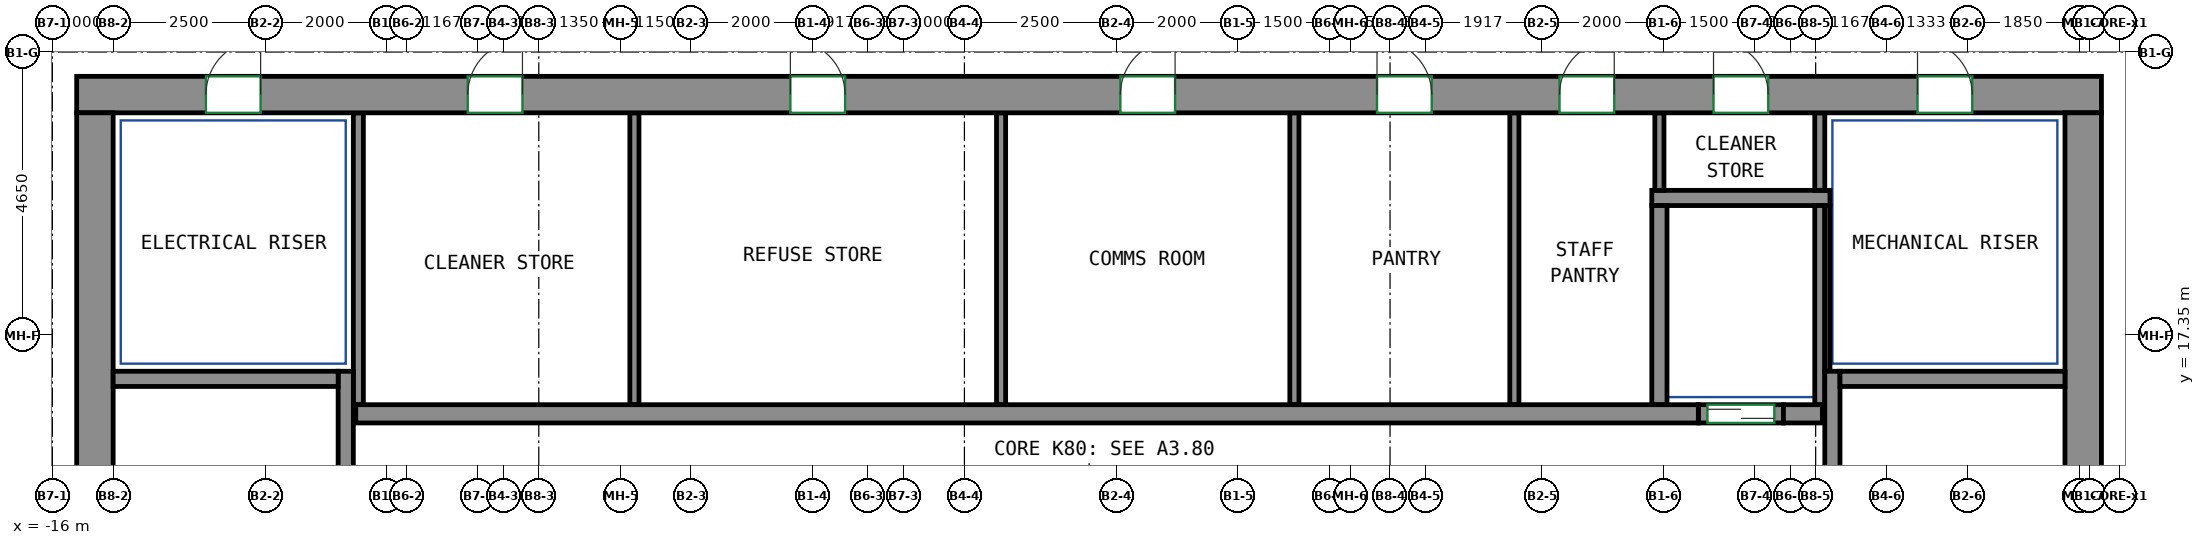
"""IFC4 building model, lengths in metres.
Left out: names, types, materials, properties, quantities, classifications, styles, units other than length and angle.
Written with IfcOpenShell. Run it as: python <this file> out.ifc"""

import sys

from ifc_helpers import new_model, si_unit, direction, frame, frame_2d, origin, place, context, subcontext, project, spatial, rectangle, extrude, source, transform, mapped, element, fill, save


model = new_model("IFC4")
c1 = context("Model", 3, precision=1e-05, world=origin(), true_north=direction((0.0, 1.0)))
c2 = subcontext(c1, "Body", "Model", "MODEL_VIEW")
j1 = project(units=[si_unit("LENGTHUNIT", "METRE"), si_unit("PLANEANGLEUNIT", "RADIAN")], contexts=[c1])
p1 = place(None, origin())
s1 = spatial("IfcSite", under=j1, at=p1, CompositionType="ELEMENT")
p2 = place(p1, origin())
s2 = spatial("IfcBuilding", under=s1, at=p2, CompositionType="ELEMENT")
p3 = place(p2, frame((0.0, 0.0, 315.4)))
s3 = spatial("IfcBuildingStorey", under=s2, at=p3, CompositionType="ELEMENT", Elevation=315.4)
m1 = source(origin(), c2, "Body", "SweptSolid", [
    extrude(rectangle(XDim=33.3, YDim=0.6, at=frame_2d((16.65, 0.0))), origin(), (0.0, 0.0, 1.0), 3.0),
])
p4 = place(p3, frame((-15.6, 21.3, 0.0), z_axis=(0.0, 0.0, 1.0), x_axis=(1.0, 0.0, 0.0)))
e1 = element("IfcWall", 1, at=p4, inside=s3, PredefinedType="SHEAR", context=c2, shape_type="MappedRepresentation", body=[
    mapped(m1, transform((0.0, 0.0, 0.0))),
])
p5 = place(p4, frame((6.431, 0.0, 0.0)))
e2 = element("IfcOpeningElement", 2, at=p5, cuts=e1, PredefinedType="OPENING", context=c2, shape_type="SweptSolid", body=[
    extrude(rectangle(XDim=0.9, YDim=2.1, at=frame_2d((0.45, 1.05))), frame((0.0, 0.31, 0.0), z_axis=(0.0, -1.0, 0.0), x_axis=(1.0, 0.0, 0.0)), (0.0, 0.0, 1.0), 0.62),
])
p6 = place(p4, frame((11.738, 0.0, 0.0)))
e3 = element("IfcOpeningElement", 3, at=p6, cuts=e1, PredefinedType="OPENING", context=c2, shape_type="SweptSolid", body=[
    extrude(rectangle(XDim=0.9, YDim=2.1, at=frame_2d((0.45, 1.05))), frame((0.0, 0.31, 0.0), z_axis=(0.0, -1.0, 0.0), x_axis=(1.0, 0.0, 0.0)), (0.0, 0.0, 1.0), 0.62),
])
p7 = place(p4, frame((17.165, 0.0, 0.0)))
e4 = element("IfcOpeningElement", 4, at=p7, cuts=e1, PredefinedType="OPENING", context=c2, shape_type="SweptSolid", body=[
    extrude(rectangle(XDim=0.9, YDim=2.1, at=frame_2d((0.45, 1.05))), frame((0.0, 0.31, 0.0), z_axis=(0.0, -1.0, 0.0), x_axis=(1.0, 0.0, 0.0)), (0.0, 0.0, 1.0), 0.62),
])
p8 = place(p4, frame((21.386, 0.0, 0.0)))
e5 = element("IfcOpeningElement", 5, at=p8, cuts=e1, PredefinedType="OPENING", context=c2, shape_type="SweptSolid", body=[
    extrude(rectangle(XDim=0.9, YDim=2.1, at=frame_2d((0.45, 1.05))), frame((0.0, 0.31, 0.0), z_axis=(0.0, -1.0, 0.0), x_axis=(1.0, 0.0, 0.0)), (0.0, 0.0, 1.0), 0.62),
])
p9 = place(p4, frame((24.387, 0.0, 0.0)))
e6 = element("IfcOpeningElement", 6, at=p9, cuts=e1, PredefinedType="OPENING", context=c2, shape_type="SweptSolid", body=[
    extrude(rectangle(XDim=0.9, YDim=2.1, at=frame_2d((0.45, 1.05))), frame((0.0, 0.31, 0.0), z_axis=(0.0, -1.0, 0.0), x_axis=(1.0, 0.0, 0.0)), (0.0, 0.0, 1.0), 0.62),
])
p10 = place(p4, frame((26.92, 0.0, 0.0)))
e7 = element("IfcOpeningElement", 7, at=p10, cuts=e1, PredefinedType="OPENING", context=c2, shape_type="SweptSolid", body=[
    extrude(rectangle(XDim=0.9, YDim=2.1, at=frame_2d((0.45, 1.05))), frame((0.0, 0.31, 0.0), z_axis=(0.0, -1.0, 0.0), x_axis=(1.0, 0.0, 0.0)), (0.0, 0.0, 1.0), 0.62),
])
p11 = place(p4, frame((2.125, 0.0, 0.0)))
e8 = element("IfcOpeningElement", 8, at=p11, cuts=e1, PredefinedType="OPENING", context=c2, shape_type="SweptSolid", body=[
    extrude(rectangle(XDim=0.9, YDim=2.1, at=frame_2d((0.45, 1.05))), frame((0.0, 0.31, 0.0), z_axis=(0.0, -1.0, 0.0), x_axis=(1.0, 0.0, 0.0)), (0.0, 0.0, 1.0), 0.62),
])
p12 = place(p4, frame((30.275, 0.0, 0.0)))
e9 = element("IfcOpeningElement", 9, at=p12, cuts=e1, PredefinedType="OPENING", context=c2, shape_type="SweptSolid", body=[
    extrude(rectangle(XDim=0.9, YDim=2.1, at=frame_2d((0.45, 1.05))), frame((0.0, 0.31, 0.0), z_axis=(0.0, -1.0, 0.0), x_axis=(1.0, 0.0, 0.0)), (0.0, 0.0, 1.0), 0.62),
])
m2 = source(origin(), c2, "Body", "SweptSolid", [
    extrude(rectangle(XDim=12.0, YDim=0.6, at=frame_2d((6.0, 0.0))), origin(), (0.0, 0.0, 1.0), 3.0),
])
for number, where, z_axis, x_axis in (
    (10, (-15.3, 9.0, 0.0), (0.0, 0.0, 1.0), (0.0, 1.0, 0.0)),
    (11, (17.4, 9.0, 0.0), (0.0, 0.0, 1.0), (0.0, 1.0, 0.0)),
):
    element("IfcWall", number, at=place(p3, frame(where, z_axis=z_axis, x_axis=x_axis)), inside=s3, PredefinedType="SHEAR", context=c2, shape_type="MappedRepresentation", body=[
        mapped(m2, transform((0.0, 0.0, 0.0))),
    ])
m3 = source(origin(), c2, "Body", "SweptSolid", [
    extrude(rectangle(XDim=7.75, YDim=0.25, at=frame_2d((3.875, 0.0))), origin(), (0.0, 0.0, 1.0), 3.0),
])
p13 = place(p3, frame((-11.175, 9.0, 0.0), z_axis=(0.0, 0.0, 1.0), x_axis=(0.0, 1.0, 0.0)))
e12 = element("IfcWall", 12, at=p13, inside=s3, PredefinedType="SHEAR", context=c2, shape_type="MappedRepresentation", body=[
    mapped(m3, transform((0.0, 0.0, 0.0))),
])
m4 = source(origin(), c2, "Body", "SweptSolid", [
    extrude(rectangle(XDim=3.7, YDim=0.25, at=frame_2d((1.85, 0.0))), origin(), (0.0, 0.0, 1.0), 3.0),
])
p14 = place(p3, frame((-15.0, 16.625, 0.0), z_axis=(0.0, 0.0, 1.0), x_axis=(1.0, 0.0, 0.0)))
e13 = element("IfcWall", 13, at=p14, inside=s3, PredefinedType="SHEAR", context=c2, shape_type="MappedRepresentation", body=[
    mapped(m4, transform((0.0, 0.0, 0.0))),
])
p15 = place(p3, frame((13.275, 9.0, 0.0), z_axis=(0.0, 0.0, 1.0), x_axis=(0.0, 1.0, 0.0)))
e14 = element("IfcWall", 14, at=p15, inside=s3, PredefinedType="SHEAR", context=c2, shape_type="MappedRepresentation", body=[
    mapped(m3, transform((0.0, 0.0, 0.0))),
])
m5 = source(origin(), c2, "Body", "SweptSolid", [
    extrude(rectangle(XDim=3.7, YDim=0.25, at=frame_2d((1.85, 0.0))), origin(), (0.0, 0.0, 1.0), 3.0),
])
p16 = place(p3, frame((13.4, 16.625, 0.0), z_axis=(0.0, 0.0, 1.0), x_axis=(1.0, 0.0, 0.0)))
e15 = element("IfcWall", 15, at=p16, inside=s3, PredefinedType="SHEAR", context=c2, shape_type="MappedRepresentation", body=[
    mapped(m5, transform((0.0, 0.0, 0.0))),
])
m6 = source(origin(), c2, "Body", "SweptSolid", [
    extrude(rectangle(XDim=22.08, YDim=0.3, at=frame_2d((11.04, 0.0))), origin(), (0.0, 0.0, 1.0), 3.0),
])
p17 = place(p3, frame((-11.01, 16.05, 0.0), z_axis=(0.0, 0.0, 1.0), x_axis=(1.0, 0.0, 0.0)))
e16 = element("IfcWall", 16, at=p17, inside=s3, PredefinedType="SHEAR", context=c2, shape_type="MappedRepresentation", body=[
    mapped(m6, transform((0.0, 0.0, 0.0))),
])
m7 = source(origin(), c2, "Body", "SweptSolid", [
    extrude(rectangle(XDim=0.64, YDim=0.3, at=frame_2d((0.32, 0.0))), origin(), (0.0, 0.0, 1.0), 3.0),
])
p18 = place(p3, frame((12.47, 16.05, 0.0), z_axis=(0.0, 0.0, 1.0), x_axis=(1.0, 0.0, 0.0)))
e17 = element("IfcWall", 17, at=p18, inside=s3, PredefinedType="SHEAR", context=c2, shape_type="MappedRepresentation", body=[
    mapped(m7, transform((0.0, 0.0, 0.0))),
])
m8 = source(origin(), c2, "Body", "SweptSolid", [
    extrude(rectangle(XDim=1.4, YDim=0.3, at=frame_2d((0.7, 0.0))), origin(), (0.0, 0.0, 1.0), 2.4),
])
p19 = place(p3, frame((11.07, 16.05, 0.0), z_axis=(0.0, 0.0, 1.0), x_axis=(1.0, 0.0, 0.0)))
e18 = element("IfcWall", 18, at=p19, inside=s3, PredefinedType="PARTITIONING", context=c2, shape_type="MappedRepresentation", body=[
    mapped(m8, transform((0.0, 0.0, 0.0))),
])
p20 = place(p19, frame((0.15, 0.0, 0.0)))
e19 = element("IfcOpeningElement", 19, at=p20, cuts=e18, PredefinedType="OPENING", context=c2, shape_type="SweptSolid", body=[
    extrude(rectangle(XDim=1.1, YDim=2.1, at=frame_2d((0.55, 1.05))), frame((0.0, 0.16, 0.0), z_axis=(0.0, -1.0, 0.0), x_axis=(1.0, 0.0, 0.0)), (0.0, 0.0, 1.0), 0.32),
])
m9 = source(origin(), c2, "Body", "SweptSolid", [
    extrude(rectangle(XDim=2.93, YDim=0.25, at=frame_2d((1.465, 0.0))), origin(), (0.0, 0.0, 1.0), 3.0),
])
p21 = place(p3, frame((10.305, 19.6, 0.0), z_axis=(0.0, 0.0, 1.0), x_axis=(1.0, 0.0, 0.0)))
e20 = element("IfcWall", 20, at=p21, inside=s3, PredefinedType="PARTITIONING", context=c2, shape_type="MappedRepresentation", body=[
    mapped(m9, transform((0.0, 0.0, 0.0))),
])
m10 = source(origin(), c2, "Body", "SweptSolid", [
    extrude(rectangle(XDim=3.275, YDim=0.165, at=frame_2d((1.638, 0.0))), origin(), (0.0, 0.0, 1.0), 3.0),
])
p22 = place(p3, frame((13.067, 16.2, 0.0), z_axis=(0.0, 0.0, 1.0), x_axis=(0.0, 1.0, 0.0)))
e21 = element("IfcWall", 21, at=p22, inside=s3, PredefinedType="PARTITIONING", context=c2, shape_type="MappedRepresentation", body=[
    mapped(m10, transform((0.0, 0.0, 0.0))),
])
m11 = source(origin(), c2, "Body", "SweptSolid", [
    extrude(rectangle(XDim=1.275, YDim=0.165, at=frame_2d((0.637, 0.0))), origin(), (0.0, 0.0, 1.0), 3.0),
])
p23 = place(p3, frame((13.067, 19.725, 0.0), z_axis=(0.0, 0.0, 1.0), x_axis=(0.0, 1.0, 0.0)))
e22 = element("IfcWall", 22, at=p23, inside=s3, PredefinedType="PARTITIONING", context=c2, shape_type="MappedRepresentation", body=[
    mapped(m11, transform((0.0, 0.0, 0.0))),
])
m12 = source(origin(), c2, "Body", "SweptSolid", [
    extrude(rectangle(XDim=4.8, YDim=0.165, at=frame_2d((2.4, 0.0))), origin(), (0.0, 0.0, 1.0), 3.0),
])
p24 = place(p3, frame((-10.968, 16.2, 0.0), z_axis=(0.0, 0.0, 1.0), x_axis=(0.0, 1.0, 0.0)))
e23 = element("IfcWall", 23, at=p24, inside=s3, PredefinedType="PARTITIONING", context=c2, shape_type="MappedRepresentation", body=[
    mapped(m12, transform((0.0, 0.0, 0.0))),
])
m13 = source(origin(), c2, "Body", "SweptSolid", [
    extrude(rectangle(XDim=3.275, YDim=0.25, at=frame_2d((1.638, 0.0))), origin(), (0.0, 0.0, 1.0), 3.0),
])
p25 = place(p3, frame((10.43, 16.2, 0.0), z_axis=(0.0, 0.0, 1.0), x_axis=(0.0, 1.0, 0.0)))
e24 = element("IfcWall", 24, at=p25, inside=s3, PredefinedType="PARTITIONING", context=c2, shape_type="MappedRepresentation", body=[
    mapped(m13, transform((0.0, 0.0, 0.0))),
])
m14 = source(origin(), c2, "Body", "SweptSolid", [
    extrude(rectangle(XDim=2.725, YDim=0.085, at=frame_2d((1.363, 0.0))), origin(), (0.0, 0.0, 1.0), 3.0),
])
p26 = place(p3, frame((13.192, 16.75, 0.0), z_axis=(0.0, 0.0, 1.0), x_axis=(0.0, 1.0, 0.0)))
e25 = element("IfcWall", 25, at=p26, inside=s3, PredefinedType="PARTITIONING", context=c2, shape_type="MappedRepresentation", body=[
    mapped(m14, transform((0.0, 0.0, 0.0))),
])
m15 = source(origin(), c2, "Body", "SweptSolid", [
    extrude(rectangle(XDim=4.8, YDim=0.15, at=frame_2d((2.4, 0.0))), origin(), (0.0, 0.0, 1.0), 3.0),
])
for number, where, z_axis, x_axis in (
    (26, (-6.427, 16.2, 0.0), (0.0, 0.0, 1.0), (0.0, 1.0, 0.0)),
    (27, (-0.397, 16.2, 0.0), (0.0, 0.0, 1.0), (0.0, 1.0, 0.0)),
    (28, (4.427, 16.2, 0.0), (0.0, 0.0, 1.0), (0.0, 1.0, 0.0)),
    (29, (8.045, 16.2, 0.0), (0.0, 0.0, 1.0), (0.0, 1.0, 0.0)),
):
    element("IfcWall", number, at=place(p3, frame(where, z_axis=z_axis, x_axis=x_axis)), inside=s3, PredefinedType="PARTITIONING", context=c2, shape_type="MappedRepresentation", body=[
        mapped(m15, transform((0.0, 0.0, 0.0))),
    ])
m16 = source(origin(), c2, "Body", "SweptSolid", [
    extrude(rectangle(XDim=1.275, YDim=0.15, at=frame_2d((0.637, 0.0))), origin(), (0.0, 0.0, 1.0), 3.0),
])
p27 = place(p3, frame((10.43, 19.725, 0.0), z_axis=(0.0, 0.0, 1.0), x_axis=(0.0, 1.0, 0.0)))
e30 = element("IfcWall", 30, at=p27, inside=s3, PredefinedType="PARTITIONING", context=c2, shape_type="MappedRepresentation", body=[
    mapped(m16, transform((0.0, 0.0, 0.0))),
])
p28 = place(p20, origin())
e31 = element("IfcDoor", 31, at=p28, inside=s3, OperationType="DOUBLE_DOOR_SLIDING", PredefinedType="DOOR", context=c2, shape_type="SweptSolid", body=[
    extrude(rectangle(XDim=1.1, YDim=2.1, at=frame_2d((0.55, 1.05))), frame((0.0, 0.025, 0.0), z_axis=(0.0, -1.0, 0.0), x_axis=(1.0, 0.0, 0.0)), (0.0, 0.0, 1.0), 0.05),
])
fill(e19, e31)
p29 = place(p5, origin())
e32 = element("IfcDoor", 32, at=p29, inside=s3, OperationType="SINGLE_SWING_RIGHT", PredefinedType="DOOR", context=c2, shape_type="SweptSolid", body=[
    extrude(rectangle(XDim=0.9, YDim=2.1, at=frame_2d((0.45, 1.05))), frame((0.0, -0.155, 0.0), z_axis=(0.0, -1.0, 0.0), x_axis=(1.0, 0.0, 0.0)), (0.0, 0.0, 1.0), 0.05),
])
fill(e2, e32)
p30 = place(p6, origin())
e33 = element("IfcDoor", 33, at=p30, inside=s3, OperationType="SINGLE_SWING_LEFT", PredefinedType="DOOR", context=c2, shape_type="SweptSolid", body=[
    extrude(rectangle(XDim=0.9, YDim=2.1, at=frame_2d((0.45, 1.05))), frame((0.0, -0.155, 0.0), z_axis=(0.0, -1.0, 0.0), x_axis=(1.0, 0.0, 0.0)), (0.0, 0.0, 1.0), 0.05),
])
fill(e3, e33)
p31 = place(p7, origin())
e34 = element("IfcDoor", 34, at=p31, inside=s3, OperationType="SINGLE_SWING_RIGHT", PredefinedType="DOOR", context=c2, shape_type="SweptSolid", body=[
    extrude(rectangle(XDim=0.9, YDim=2.1, at=frame_2d((0.45, 1.05))), frame((0.0, -0.155, 0.0), z_axis=(0.0, -1.0, 0.0), x_axis=(1.0, 0.0, 0.0)), (0.0, 0.0, 1.0), 0.05),
])
fill(e4, e34)
p32 = place(p8, origin())
e35 = element("IfcDoor", 35, at=p32, inside=s3, OperationType="SINGLE_SWING_LEFT", PredefinedType="DOOR", context=c2, shape_type="SweptSolid", body=[
    extrude(rectangle(XDim=0.9, YDim=2.1, at=frame_2d((0.45, 1.05))), frame((0.0, -0.155, 0.0), z_axis=(0.0, -1.0, 0.0), x_axis=(1.0, 0.0, 0.0)), (0.0, 0.0, 1.0), 0.05),
])
fill(e5, e35)
p33 = place(p9, origin())
e36 = element("IfcDoor", 36, at=p33, inside=s3, OperationType="SINGLE_SWING_RIGHT", PredefinedType="DOOR", context=c2, shape_type="SweptSolid", body=[
    extrude(rectangle(XDim=0.9, YDim=2.1, at=frame_2d((0.45, 1.05))), frame((0.0, -0.155, 0.0), z_axis=(0.0, -1.0, 0.0), x_axis=(1.0, 0.0, 0.0)), (0.0, 0.0, 1.0), 0.05),
])
fill(e6, e36)
p34 = place(p10, origin())
e37 = element("IfcDoor", 37, at=p34, inside=s3, OperationType="SINGLE_SWING_LEFT", PredefinedType="DOOR", context=c2, shape_type="SweptSolid", body=[
    extrude(rectangle(XDim=0.9, YDim=2.1, at=frame_2d((0.45, 1.05))), frame((0.0, -0.155, 0.0), z_axis=(0.0, -1.0, 0.0), x_axis=(1.0, 0.0, 0.0)), (0.0, 0.0, 1.0), 0.05),
])
fill(e7, e37)
p35 = place(p11, origin())
e38 = element("IfcDoor", 38, at=p35, inside=s3, OperationType="SINGLE_SWING_RIGHT", PredefinedType="DOOR", context=c2, shape_type="SweptSolid", body=[
    extrude(rectangle(XDim=0.9, YDim=2.1, at=frame_2d((0.45, 1.05))), frame((0.0, -0.155, 0.0), z_axis=(0.0, -1.0, 0.0), x_axis=(1.0, 0.0, 0.0)), (0.0, 0.0, 1.0), 0.05),
])
fill(e8, e38)
p36 = place(p12, origin())
e39 = element("IfcDoor", 39, at=p36, inside=s3, OperationType="SINGLE_SWING_LEFT", PredefinedType="DOOR", context=c2, shape_type="SweptSolid", body=[
    extrude(rectangle(XDim=0.9, YDim=2.1, at=frame_2d((0.45, 1.05))), frame((0.0, -0.155, 0.0), z_axis=(0.0, -1.0, 0.0), x_axis=(1.0, 0.0, 0.0)), (0.0, 0.0, 1.0), 0.05),
])
fill(e9, e39)
save(model, sys.argv[1])
